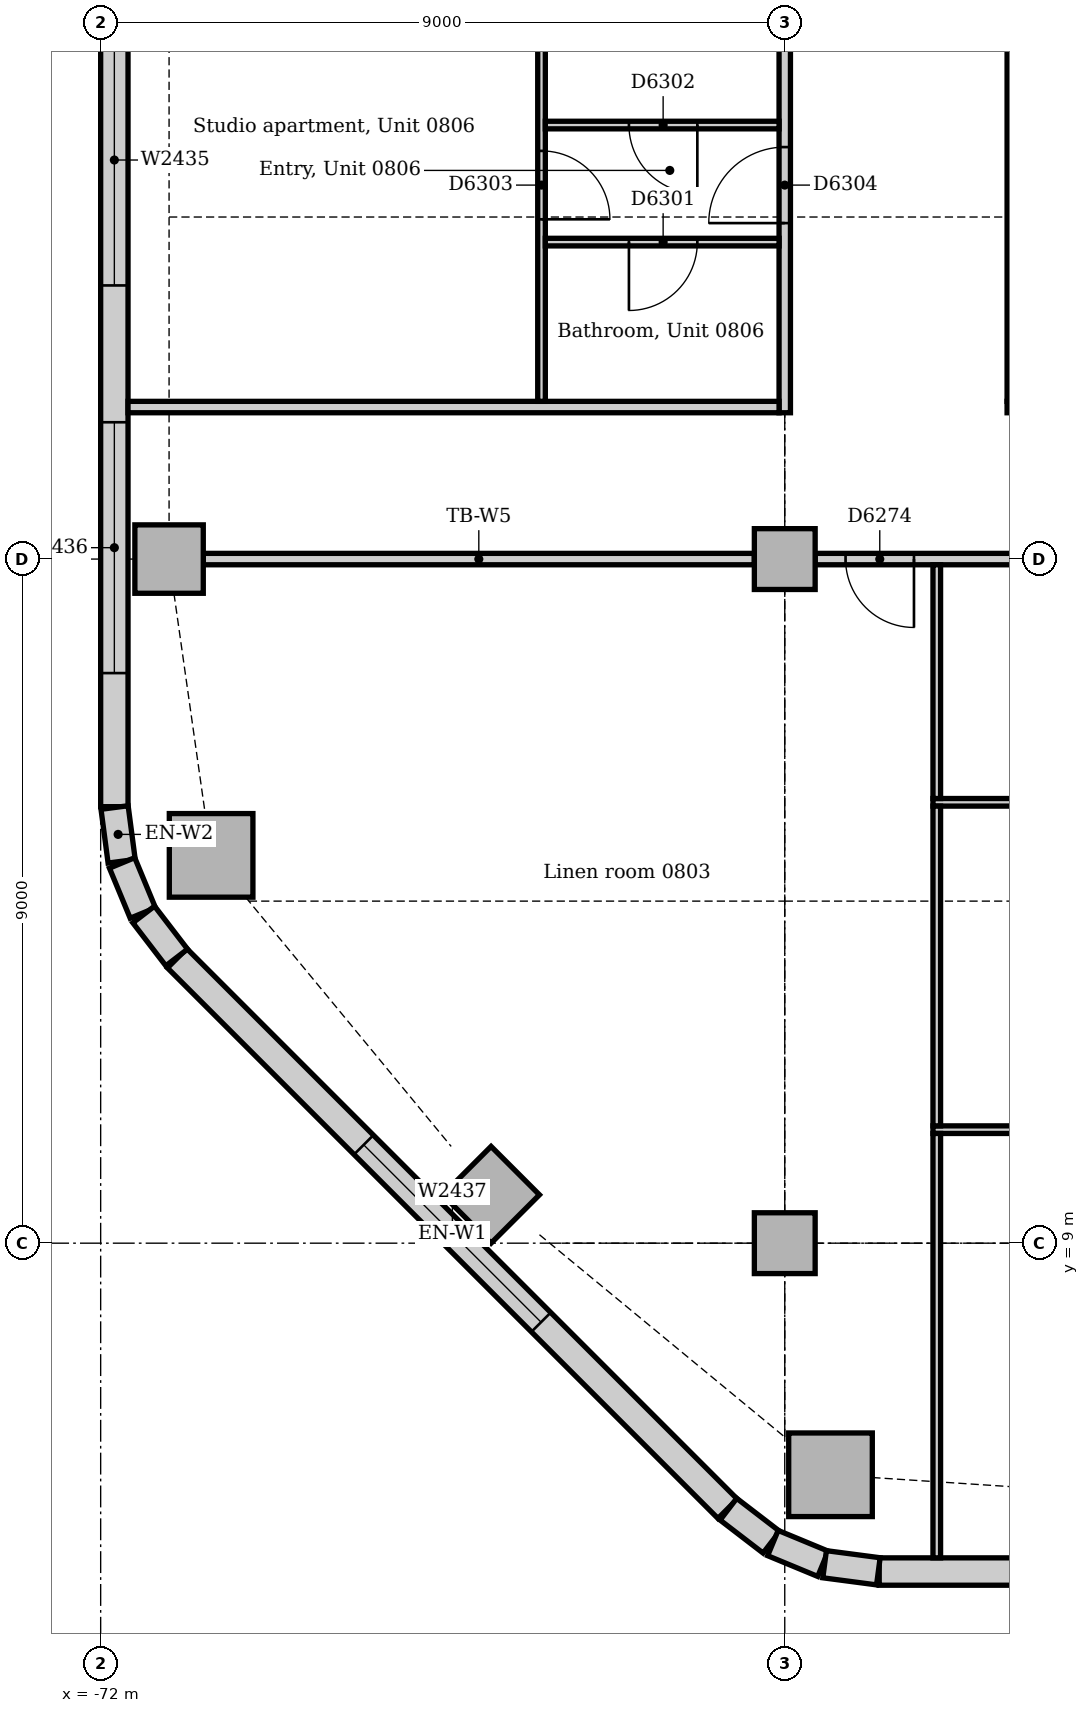
"""IFC4 building model, lengths in metres.
Left out: names, types, materials, properties, quantities, classifications, styles, units other than length and angle.
Written with IfcOpenShell. Run it as: python <this file> out.ifc"""

import sys

from ifc_helpers import new_model, si_unit, direction, frame, frame_2d, origin, origin_2d, place, context, subcontext, project, spatial, rectangle, extrude, element, fill, save


model = new_model("IFC4")
c1 = context("Model", 3, precision=1e-05, world=origin(), true_north=direction((0.0, 1.0)))
c2 = subcontext(c1, "Body", "Model", "MODEL_VIEW")
j1 = project(units=[si_unit("LENGTHUNIT", "METRE"), si_unit("PLANEANGLEUNIT", "RADIAN")], contexts=[c1])
p1 = place(None, origin())
s1 = spatial("IfcSite", under=j1, at=p1, CompositionType="ELEMENT")
p2 = place(p1, origin())
s2 = spatial("IfcBuilding", under=s1, at=p2, CompositionType="ELEMENT")
p3 = place(p2, frame((0.0, 0.0, 38.0)))
s3 = spatial("IfcBuildingStorey", under=s2, at=p3, CompositionType="ELEMENT", Elevation=38.0)
for number, where, z_axis, x_axis in (
    (1, (-62.398, 5.953, 0.0), (0.0, 0.0, 1.0), (1.0, 0.0, 0.0)),
    (2, (-70.547, 14.102, 0.0), (0.0, 0.0, 1.0), (1.0, 0.0, 0.0)),
):
    element("IfcColumn", number, at=place(p3, frame(where, z_axis=z_axis, x_axis=x_axis)), inside=s3, PredefinedType="COLUMN", context=c2, shape_type="SweptSolid", body=[
        extrude(rectangle(XDim=1.1, YDim=1.1, at=origin_2d()), origin(), (0.0, 0.0, 1.0), 3.85),
    ])
for number, where, z_axis, x_axis in (
    (3, (-71.1, 18.0, 0.0), (0.0, 0.0, 1.0), (1.0, 0.0, 0.0)),
    (4, (-66.864, 9.636, 0.0), (0.0, 0.0, 1.0), (0.707, 0.707, 0.0)),
):
    element("IfcColumn", number, at=place(p3, frame(where, z_axis=z_axis, x_axis=x_axis)), inside=s3, PredefinedType="COLUMN", context=c2, shape_type="SweptSolid", body=[
        extrude(rectangle(XDim=0.9, YDim=0.9, at=origin_2d()), origin(), (0.0, 0.0, 1.0), 3.85),
    ])
for number, where, z_axis, x_axis in (
    (5, (-63.0, 9.0, 0.0), (0.0, 0.0, 1.0), (1.0, 0.0, 0.0)),
    (6, (-63.0, 18.0, 0.0), (0.0, 0.0, 1.0), (1.0, 0.0, 0.0)),
):
    element("IfcColumn", number, at=place(p3, frame(where, z_axis=z_axis, x_axis=x_axis)), inside=s3, PredefinedType="COLUMN", context=c2, shape_type="SweptSolid", body=[
        extrude(rectangle(XDim=0.8, YDim=0.8, at=origin_2d()), origin(), (0.0, 0.0, 1.0), 3.85),
    ])
p4 = place(p3, frame((-61.757, 4.68, 0.0), z_axis=(0.0, 0.0, 1.0), x_axis=(1.0, 0.0, 0.0)))
e7 = element("IfcWall", 7, at=p4, inside=s3, PredefinedType="STANDARD", context=c2, shape_type="SweptSolid", body=[
    extrude(rectangle(XDim=30.515, YDim=0.36, at=frame_2d((15.257, 0.0))), origin(), (0.0, 0.0, 1.0), 3.85),
])
p5 = place(p4, frame((2.357, 0.0, 0.9)))
e8 = element("IfcOpeningElement", 8, at=p5, cuts=e7, PredefinedType="OPENING", context=c2, shape_type="SweptSolid", body=[
    extrude(rectangle(XDim=3.3, YDim=1.6, at=frame_2d((1.65, 0.8))), frame((0.0, 0.19, 0.0), z_axis=(0.0, -1.0, 0.0), x_axis=(1.0, 0.0, 0.0)), (0.0, 0.0, 1.0), 0.38),
])
p6 = place(p4, frame((6.857, 0.0, 0.9)))
e9 = element("IfcOpeningElement", 9, at=p6, cuts=e7, PredefinedType="OPENING", context=c2, shape_type="SweptSolid", body=[
    extrude(rectangle(XDim=3.3, YDim=1.6, at=frame_2d((1.65, 0.8))), frame((0.0, 0.19, 0.0), z_axis=(0.0, -1.0, 0.0), x_axis=(1.0, 0.0, 0.0)), (0.0, 0.0, 1.0), 0.38),
])
p7 = place(p4, frame((11.357, 0.0, 0.9)))
e10 = element("IfcOpeningElement", 10, at=p7, cuts=e7, PredefinedType="OPENING", context=c2, shape_type="SweptSolid", body=[
    extrude(rectangle(XDim=3.3, YDim=1.6, at=frame_2d((1.65, 0.8))), frame((0.0, 0.19, 0.0), z_axis=(0.0, -1.0, 0.0), x_axis=(1.0, 0.0, 0.0)), (0.0, 0.0, 1.0), 0.38),
])
p8 = place(p4, frame((15.857, 0.0, 0.9)))
e11 = element("IfcOpeningElement", 11, at=p8, cuts=e7, PredefinedType="OPENING", context=c2, shape_type="SweptSolid", body=[
    extrude(rectangle(XDim=3.3, YDim=1.6, at=frame_2d((1.65, 0.8))), frame((0.0, 0.19, 0.0), z_axis=(0.0, -1.0, 0.0), x_axis=(1.0, 0.0, 0.0)), (0.0, 0.0, 1.0), 0.38),
])
p9 = place(p4, frame((20.357, 0.0, 0.9)))
e12 = element("IfcOpeningElement", 12, at=p9, cuts=e7, PredefinedType="OPENING", context=c2, shape_type="SweptSolid", body=[
    extrude(rectangle(XDim=3.3, YDim=1.6, at=frame_2d((1.65, 0.8))), frame((0.0, 0.19, 0.0), z_axis=(0.0, -1.0, 0.0), x_axis=(1.0, 0.0, 0.0)), (0.0, 0.0, 1.0), 0.38),
])
p10 = place(p4, frame((24.857, 0.0, 0.9)))
e13 = element("IfcOpeningElement", 13, at=p10, cuts=e7, PredefinedType="OPENING", context=c2, shape_type="SweptSolid", body=[
    extrude(rectangle(XDim=3.3, YDim=1.6, at=frame_2d((1.65, 0.8))), frame((0.0, 0.19, 0.0), z_axis=(0.0, -1.0, 0.0), x_axis=(1.0, 0.0, 0.0)), (0.0, 0.0, 1.0), 0.38),
])
p11 = place(p3, frame((-71.82, 40.757, 0.0), z_axis=(0.0, 0.0, 1.0), x_axis=(0.0, -1.0, 0.0)))
e14 = element("IfcWall", 14, at=p11, inside=s3, PredefinedType="STANDARD", context=c2, shape_type="SweptSolid", body=[
    extrude(rectangle(XDim=26.015, YDim=0.36, at=frame_2d((13.007, 0.0))), origin(), (0.0, 0.0, 1.0), 3.85),
])
p12 = place(p11, frame((2.357, 0.0, 0.9)))
e15 = element("IfcOpeningElement", 15, at=p12, cuts=e14, PredefinedType="OPENING", context=c2, shape_type="SweptSolid", body=[
    extrude(rectangle(XDim=3.3, YDim=1.6, at=frame_2d((1.65, 0.8))), frame((0.0, 0.19, 0.0), z_axis=(0.0, -1.0, 0.0), x_axis=(1.0, 0.0, 0.0)), (0.0, 0.0, 1.0), 0.38),
])
p13 = place(p11, frame((7.057, 0.0, 0.9)))
e16 = element("IfcOpeningElement", 16, at=p13, cuts=e14, PredefinedType="OPENING", context=c2, shape_type="SweptSolid", body=[
    extrude(rectangle(XDim=3.3, YDim=1.6, at=frame_2d((1.65, 0.8))), frame((0.0, 0.19, 0.0), z_axis=(0.0, -1.0, 0.0), x_axis=(1.0, 0.0, 0.0)), (0.0, 0.0, 1.0), 0.38),
])
p14 = place(p11, frame((11.357, 0.0, 0.9)))
e17 = element("IfcOpeningElement", 17, at=p14, cuts=e14, PredefinedType="OPENING", context=c2, shape_type="SweptSolid", body=[
    extrude(rectangle(XDim=3.3, YDim=1.6, at=frame_2d((1.65, 0.8))), frame((0.0, 0.19, 0.0), z_axis=(0.0, -1.0, 0.0), x_axis=(1.0, 0.0, 0.0)), (0.0, 0.0, 1.0), 0.38),
])
p15 = place(p11, frame((15.857, 0.0, 0.9)))
e18 = element("IfcOpeningElement", 18, at=p15, cuts=e14, PredefinedType="OPENING", context=c2, shape_type="SweptSolid", body=[
    extrude(rectangle(XDim=3.3, YDim=1.6, at=frame_2d((1.65, 0.8))), frame((0.0, 0.19, 0.0), z_axis=(0.0, -1.0, 0.0), x_axis=(1.0, 0.0, 0.0)), (0.0, 0.0, 1.0), 0.38),
])
p16 = place(p11, frame((20.957, 0.0, 0.9)))
e19 = element("IfcOpeningElement", 19, at=p16, cuts=e14, PredefinedType="OPENING", context=c2, shape_type="SweptSolid", body=[
    extrude(rectangle(XDim=3.3, YDim=1.6, at=frame_2d((1.65, 0.8))), frame((0.0, 0.19, 0.0), z_axis=(0.0, -1.0, 0.0), x_axis=(1.0, 0.0, 0.0)), (0.0, 0.0, 1.0), 0.38),
])
p17 = place(p3, frame((-70.994, 12.749, 0.0), z_axis=(0.0, 0.0, 1.0), x_axis=(0.707106781187, -0.707106781187, 0.0)))
e20 = element("IfcWall", 20, at=p17, inside=s3, PredefinedType="STANDARD", context=c2, shape_type="SweptSolid", body=[
    extrude(rectangle(XDim=10.243, YDim=0.36, at=frame_2d((5.121, 0.0))), origin(), (0.0, 0.0, 1.0), 3.85),
])
p18 = place(p17, frame((3.471, 0.0, 0.9)))
e21 = element("IfcOpeningElement", 21, at=p18, cuts=e20, PredefinedType="OPENING", context=c2, shape_type="SweptSolid", body=[
    extrude(rectangle(XDim=3.3, YDim=1.6, at=frame_2d((1.65, 0.8))), frame((0.0, 0.19, 0.0), z_axis=(0.0, -1.0, 0.0), x_axis=(1.0, 0.0, 0.0)), (0.0, 0.0, 1.0), 0.38),
])
for number, where, z_axis, x_axis in (
    (22, (-71.817, 14.731, 0.0), (0.0, 0.0, 1.0), (0.131, -0.991, 0.0)),
    (23, (-71.718, 14.003, 0.0), (0.0, 0.0, 1.0), (0.383, -0.924, 0.0)),
):
    element("IfcWall", number, at=place(p3, frame(where, z_axis=z_axis, x_axis=x_axis)), inside=s3, PredefinedType="STANDARD", context=c2, shape_type="SweptSolid", body=[
        extrude(rectangle(XDim=0.713, YDim=0.36, at=frame_2d((0.356, 0.0))), origin(), (0.0, 0.0, 1.0), 3.85),
    ])
for number, where, z_axis, x_axis in (
    (24, (-71.434, 13.325, 0.0), (0.0, 0.0, 1.0), (0.609, -0.793, 0.0)),
    (25, (-63.741, 5.5, 0.0), (0.0, 0.0, 1.0), (0.793, -0.609, 0.0)),
):
    element("IfcWall", number, at=place(p3, frame(where, z_axis=z_axis, x_axis=x_axis)), inside=s3, PredefinedType="STANDARD", context=c2, shape_type="SweptSolid", body=[
        extrude(rectangle(XDim=0.713, YDim=0.36, at=frame_2d((0.357, 0.0))), origin(), (0.0, 0.0, 1.0), 3.85),
    ])
for number, where, z_axis, x_axis in (
    (26, (-63.156, 5.055, 0.0), (0.0, 0.0, 1.0), (0.924, -0.383, 0.0)),
    (27, (-62.476, 4.776, 0.0), (0.0, 0.0, 1.0), (0.991, -0.131, 0.0)),
):
    element("IfcWall", number, at=place(p3, frame(where, z_axis=z_axis, x_axis=x_axis)), inside=s3, PredefinedType="STANDARD", context=c2, shape_type="SweptSolid", body=[
        extrude(rectangle(XDim=0.713, YDim=0.36, at=frame_2d((0.356, 0.0))), origin(), (0.0, 0.0, 1.0), 3.85),
    ])
p19 = place(p3, frame((-62.6, 18.0, 0.0), z_axis=(0.0, 0.0, 1.0), x_axis=(1.0, 0.0, 0.0)))
e28 = element("IfcWall", 28, at=p19, inside=s3, PredefinedType="PARTITIONING", context=c2, shape_type="SweptSolid", body=[
    extrude(rectangle(XDim=8.2, YDim=0.15, at=frame_2d((4.1, 0.0))), origin(), (0.0, 0.0, 1.0), 3.15),
])
p20 = place(p19, frame((0.4, 0.0, 0.0)))
e29 = element("IfcOpeningElement", 29, at=p20, cuts=e28, PredefinedType="OPENING", context=c2, shape_type="SweptSolid", body=[
    extrude(rectangle(XDim=0.9, YDim=2.1, at=frame_2d((0.45, 1.05))), frame((0.0, 0.085, 0.0), z_axis=(0.0, -1.0, 0.0), x_axis=(1.0, 0.0, 0.0)), (0.0, 0.0, 1.0), 0.17),
])
p21 = place(p19, frame((6.81, 0.0, 0.0)))
e30 = element("IfcOpeningElement", 30, at=p21, cuts=e28, PredefinedType="OPENING", context=c2, shape_type="SweptSolid", body=[
    extrude(rectangle(XDim=1.0, YDim=2.1, at=frame_2d((0.5, 1.05))), frame((0.0, 0.085, 0.0), z_axis=(0.0, -1.0, 0.0), x_axis=(1.0, 0.0, 0.0)), (0.0, 0.0, 1.0), 0.17),
])
p22 = place(p3, frame((-70.65, 18.0, 0.0), z_axis=(0.0, 0.0, 1.0), x_axis=(1.0, 0.0, 0.0)))
e31 = element("IfcWall", 31, at=p22, inside=s3, PredefinedType="PARTITIONING", context=c2, shape_type="SweptSolid", body=[
    extrude(rectangle(XDim=7.25, YDim=0.15, at=frame_2d((3.625, 0.0))), origin(), (0.0, 0.0, 1.0), 3.15),
])
p23 = place(p3, frame((-60.075, 20.0, 0.0), z_axis=(0.0, 0.0, 1.0), x_axis=(1.0, 0.0, 0.0)))
e32 = element("IfcWall", 32, at=p23, inside=s3, PredefinedType="PARTITIONING", context=c2, shape_type="SweptSolid", body=[
    extrude(rectangle(XDim=15.15, YDim=0.15, at=frame_2d((7.575, 0.0))), origin(), (0.0, 0.0, 1.0), 3.85),
])
p24 = place(p23, frame((3.4, 0.0, 0.0)))
e33 = element("IfcOpeningElement", 33, at=p24, cuts=e32, PredefinedType="OPENING", context=c2, shape_type="SweptSolid", body=[
    extrude(rectangle(XDim=0.9, YDim=2.1, at=frame_2d((0.45, 1.05))), frame((0.0, 0.085, 0.0), z_axis=(0.0, -1.0, 0.0), x_axis=(1.0, 0.0, 0.0)), (0.0, 0.0, 1.0), 0.17),
])
p25 = place(p3, frame((-63.0, 19.925, 0.0), z_axis=(0.0, 0.0, 1.0), x_axis=(0.0, 1.0, 0.0)))
e34 = element("IfcWall", 34, at=p25, inside=s3, PredefinedType="PARTITIONING", context=c2, shape_type="SweptSolid", body=[
    extrude(rectangle(XDim=6.675, YDim=0.15, at=frame_2d((3.337, 0.0))), origin(), (0.0, 0.0, 1.0), 3.158),
])
p26 = place(p25, frame((2.495, 0.0, 0.0)))
e35 = element("IfcOpeningElement", 35, at=p26, cuts=e34, PredefinedType="OPENING", context=c2, shape_type="SweptSolid", body=[
    extrude(rectangle(XDim=1.0, YDim=2.1, at=frame_2d((0.5, 1.05))), frame((0.0, 0.085, 0.0), z_axis=(0.0, -1.0, 0.0), x_axis=(1.0, 0.0, 0.0)), (0.0, 0.0, 1.0), 0.17),
])
p27 = place(p3, frame((-60.0, 20.075, 0.0), z_axis=(0.0, 0.0, 1.0), x_axis=(0.0, 1.0, 0.0)))
e36 = element("IfcWall", 36, at=p27, inside=s3, PredefinedType="PARTITIONING", context=c2, shape_type="SweptSolid", body=[
    extrude(rectangle(XDim=9.25, YDim=0.15, at=frame_2d((4.625, 0.0))), origin(), (0.0, 0.0, 1.0), 3.85),
])
p28 = place(p3, frame((-71.64, 20.0, 0.0), z_axis=(0.0, 0.0, 1.0), x_axis=(1.0, 0.0, 0.0)))
e37 = element("IfcWall", 37, at=p28, inside=s3, PredefinedType="PARTITIONING", context=c2, shape_type="SweptSolid", body=[
    extrude(rectangle(XDim=8.565, YDim=0.15, at=frame_2d((4.282, 0.0))), origin(), (0.0, 0.0, 1.0), 3.85),
])
p29 = place(p3, frame((-61.05, 14.8, 0.0), z_axis=(0.0, 0.0, 1.0), x_axis=(1.0, 0.0, 0.0)))
e38 = element("IfcWall", 38, at=p29, inside=s3, PredefinedType="PARTITIONING", context=c2, shape_type="SweptSolid", body=[
    extrude(rectangle(XDim=15.975, YDim=0.1, at=frame_2d((7.987, 0.0))), origin(), (0.0, 0.0, 1.0), 3.85),
])
p30 = place(p29, frame((6.31, 0.0, 0.0)))
e39 = element("IfcOpeningElement", 39, at=p30, cuts=e38, PredefinedType="OPENING", context=c2, shape_type="SweptSolid", body=[
    extrude(rectangle(XDim=0.9, YDim=2.1, at=frame_2d((0.45, 1.05))), frame((0.0, 0.06, 0.0), z_axis=(0.0, -1.0, 0.0), x_axis=(1.0, 0.0, 0.0)), (0.0, 0.0, 1.0), 0.12),
])
p31 = place(p3, frame((-61.05, 10.493, 0.0), z_axis=(0.0, 0.0, 1.0), x_axis=(1.0, 0.0, 0.0)))
e40 = element("IfcWall", 40, at=p31, inside=s3, PredefinedType="PARTITIONING", context=c2, shape_type="SweptSolid", body=[
    extrude(rectangle(XDim=15.975, YDim=0.1, at=frame_2d((7.987, 0.0))), origin(), (0.0, 0.0, 1.0), 3.85),
])
p32 = place(p31, frame((4.65, 0.0, 0.0)))
e41 = element("IfcOpeningElement", 41, at=p32, cuts=e40, PredefinedType="OPENING", context=c2, shape_type="SweptSolid", body=[
    extrude(rectangle(XDim=0.9, YDim=2.1, at=frame_2d((0.45, 1.05))), frame((0.0, 0.06, 0.0), z_axis=(0.0, -1.0, 0.0), x_axis=(1.0, 0.0, 0.0)), (0.0, 0.0, 1.0), 0.12),
])
p33 = place(p31, frame((12.5, 0.0, 0.0)))
e42 = element("IfcOpeningElement", 42, at=p33, cuts=e40, PredefinedType="OPENING", context=c2, shape_type="SweptSolid", body=[
    extrude(rectangle(XDim=0.9, YDim=2.1, at=frame_2d((0.45, 1.05))), frame((0.0, 0.06, 0.0), z_axis=(0.0, -1.0, 0.0), x_axis=(1.0, 0.0, 0.0)), (0.0, 0.0, 1.0), 0.12),
])
p34 = place(p3, frame((-66.2, 20.075, 0.0), z_axis=(0.0, 0.0, 1.0), x_axis=(0.0, 1.0, 0.0)))
e43 = element("IfcWall", 43, at=p34, inside=s3, PredefinedType="PARTITIONING", context=c2, shape_type="SweptSolid", body=[
    extrude(rectangle(XDim=6.85, YDim=0.1, at=frame_2d((3.425, 0.0))), origin(), (0.0, 0.0, 1.0), 3.85),
])
p35 = place(p34, frame((2.395, 0.0, 0.0)))
e44 = element("IfcOpeningElement", 44, at=p35, cuts=e43, PredefinedType="OPENING", context=c2, shape_type="SweptSolid", body=[
    extrude(rectangle(XDim=0.9, YDim=2.1, at=frame_2d((0.45, 1.05))), frame((0.0, 0.06, 0.0), z_axis=(0.0, -1.0, 0.0), x_axis=(1.0, 0.0, 0.0)), (0.0, 0.0, 1.0), 0.12),
])
p36 = place(p3, frame((-61.0, 14.85, 0.0), z_axis=(0.0, 0.0, 1.0), x_axis=(0.0, 1.0, 0.0)))
e45 = element("IfcWall", 45, at=p36, inside=s3, PredefinedType="PARTITIONING", context=c2, shape_type="SweptSolid", body=[
    extrude(rectangle(XDim=3.075, YDim=0.1, at=frame_2d((1.538, 0.0))), origin(), (0.0, 0.0, 1.0), 3.85),
])
p37 = place(p3, frame((-61.0, 10.543, 0.0), z_axis=(0.0, 0.0, 1.0), x_axis=(0.0, 1.0, 0.0)))
e46 = element("IfcWall", 46, at=p37, inside=s3, PredefinedType="PARTITIONING", context=c2, shape_type="SweptSolid", body=[
    extrude(rectangle(XDim=4.207, YDim=0.1, at=frame_2d((2.103, 0.0))), origin(), (0.0, 0.0, 1.0), 3.85),
])
p38 = place(p3, frame((-61.0, 4.86, 0.0), z_axis=(0.0, 0.0, 1.0), x_axis=(0.0, 1.0, 0.0)))
e47 = element("IfcWall", 47, at=p38, inside=s3, PredefinedType="PARTITIONING", context=c2, shape_type="SweptSolid", body=[
    extrude(rectangle(XDim=5.583, YDim=0.1, at=frame_2d((2.792, 0.0))), origin(), (0.0, 0.0, 1.0), 3.85),
])
p39 = place(p3, frame((-66.15, 22.17, 0.0), z_axis=(0.0, 0.0, 1.0), x_axis=(1.0, 0.0, 0.0)))
e48 = element("IfcWall", 48, at=p39, inside=s3, PredefinedType="PARTITIONING", context=c2, shape_type="SweptSolid", body=[
    extrude(rectangle(XDim=3.075, YDim=0.1, at=frame_2d((1.538, 0.0))), origin(), (0.0, 0.0, 1.0), 3.85),
])
p40 = place(p39, frame((1.1, 0.0, 0.0)))
e49 = element("IfcOpeningElement", 49, at=p40, cuts=e48, PredefinedType="OPENING", context=c2, shape_type="SweptSolid", body=[
    extrude(rectangle(XDim=0.9, YDim=2.1, at=frame_2d((0.45, 1.05))), frame((0.0, 0.06, 0.0), z_axis=(0.0, -1.0, 0.0), x_axis=(1.0, 0.0, 0.0)), (0.0, 0.0, 1.0), 0.12),
])
p41 = place(p3, frame((-66.15, 23.71, 0.0), z_axis=(0.0, 0.0, 1.0), x_axis=(1.0, 0.0, 0.0)))
e50 = element("IfcWall", 50, at=p41, inside=s3, PredefinedType="PARTITIONING", context=c2, shape_type="SweptSolid", body=[
    extrude(rectangle(XDim=3.075, YDim=0.1, at=frame_2d((1.538, 0.0))), origin(), (0.0, 0.0, 1.0), 3.85),
])
p42 = place(p41, frame((1.1, 0.0, 0.0)))
e51 = element("IfcOpeningElement", 51, at=p42, cuts=e50, PredefinedType="OPENING", context=c2, shape_type="SweptSolid", body=[
    extrude(rectangle(XDim=0.9, YDim=2.1, at=frame_2d((0.45, 1.05))), frame((0.0, 0.06, 0.0), z_axis=(0.0, -1.0, 0.0), x_axis=(1.0, 0.0, 0.0)), (0.0, 0.0, 1.0), 0.12),
])
p43 = place(p15, origin())
e52 = element("IfcWindow", 52, at=p43, inside=s3, PartitioningType="SINGLE_PANEL", PredefinedType="WINDOW", context=c2, shape_type="SweptSolid", body=[
    extrude(rectangle(XDim=3.3, YDim=1.6, at=frame_2d((1.65, 0.8))), frame((0.0, 0.13, 0.0), z_axis=(0.0, -1.0, 0.0), x_axis=(1.0, 0.0, 0.0)), (0.0, 0.0, 1.0), 0.06),
])
fill(e18, e52)
p44 = place(p16, origin())
e53 = element("IfcWindow", 53, at=p44, inside=s3, PartitioningType="SINGLE_PANEL", PredefinedType="WINDOW", context=c2, shape_type="SweptSolid", body=[
    extrude(rectangle(XDim=3.3, YDim=1.6, at=frame_2d((1.65, 0.8))), frame((0.0, 0.13, 0.0), z_axis=(0.0, -1.0, 0.0), x_axis=(1.0, 0.0, 0.0)), (0.0, 0.0, 1.0), 0.06),
])
fill(e19, e53)
p45 = place(p18, origin())
e54 = element("IfcWindow", 54, at=p45, inside=s3, PartitioningType="SINGLE_PANEL", PredefinedType="WINDOW", context=c2, shape_type="SweptSolid", body=[
    extrude(rectangle(XDim=3.3, YDim=1.6, at=frame_2d((1.65, 0.8))), frame((0.0, 0.13, 0.0), z_axis=(0.0, -1.0, 0.0), x_axis=(1.0, 0.0, 0.0)), (0.0, 0.0, 1.0), 0.06),
])
fill(e21, e54)
p46 = place(p20, frame((0.9, 0.0, 0.0), z_axis=(0.0, 0.0, 1.0), x_axis=(-1.0, 0.0, 0.0)))
e55 = element("IfcDoor", 55, at=p46, inside=s3, OperationType="SINGLE_SWING_LEFT", PredefinedType="DOOR", context=c2, shape_type="SweptSolid", body=[
    extrude(rectangle(XDim=0.9, YDim=2.1, at=frame_2d((0.45, 1.05))), frame((0.0, 0.025, 0.0), z_axis=(0.0, -1.0, 0.0), x_axis=(1.0, 0.0, 0.0)), (0.0, 0.0, 1.0), 0.05),
])
fill(e29, e55)
p47 = place(p40, frame((0.9, 0.0, 0.0), z_axis=(0.0, 0.0, 1.0), x_axis=(-1.0, 0.0, 0.0)))
e56 = element("IfcDoor", 56, at=p47, inside=s3, OperationType="SINGLE_SWING_RIGHT", PredefinedType="DOOR", context=c2, shape_type="SweptSolid", body=[
    extrude(rectangle(XDim=0.9, YDim=2.1, at=frame_2d((0.45, 1.05))), frame((0.0, 0.025, 0.0), z_axis=(0.0, -1.0, 0.0), x_axis=(1.0, 0.0, 0.0)), (0.0, 0.0, 1.0), 0.05),
])
fill(e49, e56)
p48 = place(p42, frame((0.9, 0.0, 0.0), z_axis=(0.0, 0.0, 1.0), x_axis=(-1.0, 0.0, 0.0)))
e57 = element("IfcDoor", 57, at=p48, inside=s3, OperationType="SINGLE_SWING_LEFT", PredefinedType="DOOR", context=c2, shape_type="SweptSolid", body=[
    extrude(rectangle(XDim=0.9, YDim=2.1, at=frame_2d((0.45, 1.05))), frame((0.0, 0.025, 0.0), z_axis=(0.0, -1.0, 0.0), x_axis=(1.0, 0.0, 0.0)), (0.0, 0.0, 1.0), 0.05),
])
fill(e51, e57)
p49 = place(p35, frame((0.9, 0.0, 0.0), z_axis=(0.0, 0.0, 1.0), x_axis=(-1.0, 0.0, 0.0)))
e58 = element("IfcDoor", 58, at=p49, inside=s3, OperationType="SINGLE_SWING_RIGHT", PredefinedType="DOOR", context=c2, shape_type="SweptSolid", body=[
    extrude(rectangle(XDim=0.9, YDim=2.1, at=frame_2d((0.45, 1.05))), frame((0.0, 0.025, 0.0), z_axis=(0.0, -1.0, 0.0), x_axis=(1.0, 0.0, 0.0)), (0.0, 0.0, 1.0), 0.05),
])
fill(e44, e58)
p50 = place(p26, origin())
e59 = element("IfcDoor", 59, at=p50, inside=s3, OperationType="SINGLE_SWING_LEFT", PredefinedType="DOOR", context=c2, shape_type="SweptSolid", body=[
    extrude(rectangle(XDim=1.0, YDim=2.1, at=frame_2d((0.5, 1.05))), frame((0.0, 0.025, 0.0), z_axis=(0.0, -1.0, 0.0), x_axis=(1.0, 0.0, 0.0)), (0.0, 0.0, 1.0), 0.05),
])
fill(e35, e59)
save(model, sys.argv[1])
